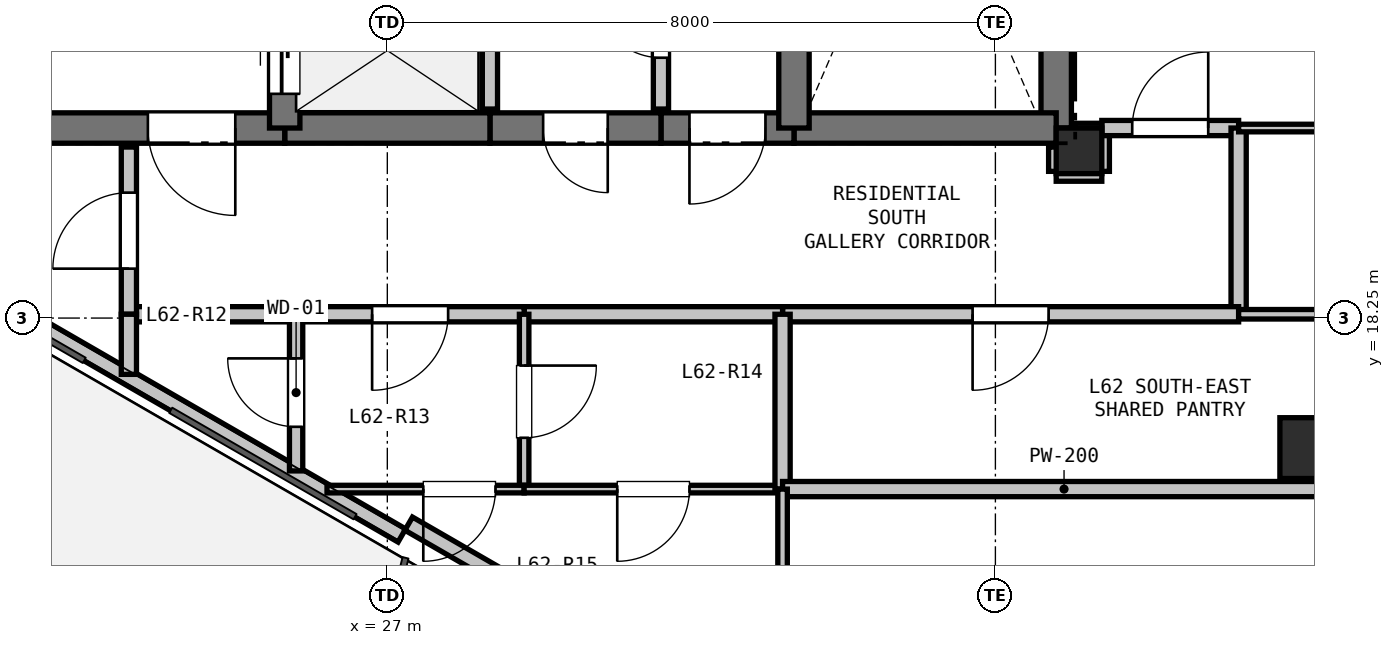
"""IFC4 building model, lengths in metres.
Left out: names, types, materials, properties, quantities, classifications, styles, units other than length and angle.
Written with IfcOpenShell. Run it as: python <this file> out.ifc"""

import sys

from ifc_helpers import new_model, si_unit, direction, frame, frame_2d, origin, origin_2d, place, context, subcontext, project, spatial, rectangle, hollow_rectangle, extrude, element, fill, save


model = new_model("IFC4")
c1 = context("Model", 3, precision=1e-05, world=origin(), true_north=direction((0.0, 1.0)))
c2 = subcontext(c1, "Body", "Model", "MODEL_VIEW")
j1 = project(units=[si_unit("LENGTHUNIT", "METRE"), si_unit("PLANEANGLEUNIT", "RADIAN")], contexts=[c1])
p1 = place(None, origin())
s1 = spatial("IfcSite", under=j1, at=p1, CompositionType="ELEMENT")
p2 = place(p1, origin())
s2 = spatial("IfcBuilding", under=s1, at=p2, CompositionType="ELEMENT")
p3 = place(p2, frame((0.0, 0.0, 223.2)))
s3 = spatial("IfcBuildingStorey", under=s2, at=p3, CompositionType="ELEMENT", Elevation=223.2)
p4 = place(p3, frame((36.1, 20.45, 0.0), z_axis=(0.0, 0.0, 1.0), x_axis=(1.0, 0.0, 0.0)))
e1 = element("IfcColumn", 1, at=p4, inside=s3, PredefinedType="COLUMN", context=c2, shape_type="SweptSolid", body=[
    extrude(rectangle(XDim=0.6, YDim=0.6, at=origin_2d()), origin(), (0.0, 0.0, 1.0), 3.3),
])
p5 = place(p3, frame((39.143, 16.539, -0.22), z_axis=(0.0, 0.0, 1.0), x_axis=(1.0, 0.0, 0.0)))
e2 = element("IfcColumn", 2, at=p5, inside=s3, PredefinedType="COLUMN", context=c2, shape_type="SweptSolid", body=[
    extrude(hollow_rectangle(XDim=0.8, YDim=0.8, WallThickness=0.025, at=origin_2d()), origin(), (0.0, 0.0, 1.0), 3.52),
])
p6 = place(p3, frame((27.191, 15.389, 0.0), z_axis=(0.0, 0.0, 1.0), x_axis=(-0.866019557082, 0.500010126649, 0.0)))
e3 = element("IfcWall", 3, at=p6, inside=s3, PredefinedType="PARAPET", context=c2, shape_type="SweptSolid", body=[
    extrude(rectangle(XDim=8.228, YDim=0.2, at=frame_2d((4.114, 0.0))), origin(), (0.0, 0.0, 1.0), 0.2),
])
p7 = place(p3, frame((28.754, 14.695, 0.0), z_axis=(0.0, 0.0, 1.0), x_axis=(-0.866025371046, 0.500000056704, 0.0)))
e4 = element("IfcWall", 4, at=p7, inside=s3, PredefinedType="PARAPET", context=c2, shape_type="SweptSolid", body=[
    extrude(rectangle(XDim=1.7, YDim=0.2, at=frame_2d((0.85, 0.0))), origin(), (0.0, 0.0, 1.0), 2.7),
])
p8 = place(p3, frame((35.8, 28.1, 0.0), z_axis=(0.0, 0.0, 1.0), x_axis=(0.0, -1.0, 0.0)))
e5 = element("IfcWall", 5, at=p8, inside=s3, PredefinedType="SHEAR", context=c2, shape_type="SweptSolid", body=[
    extrude(rectangle(XDim=7.35, YDim=0.4, at=frame_2d((3.675, 0.0))), origin(), (0.0, 0.0, 1.0), 3.08),
])
p9 = place(p3, frame((35.8, 20.75, 0.0), z_axis=(0.0, 0.0, 1.0), x_axis=(-1.0, 0.0, 0.0)))
e6 = element("IfcWall", 6, at=p9, inside=s3, PredefinedType="SHEAR", context=c2, shape_type="SweptSolid", body=[
    extrude(rectangle(XDim=3.45, YDim=0.4, at=frame_2d((1.725, 0.0))), origin(), (0.0, 0.0, 1.0), 3.08),
])
p10 = place(p3, frame((32.35, 20.75, 0.0), z_axis=(0.0, 0.0, 1.0), x_axis=(-1.0, 0.0, 0.0)))
e7 = element("IfcWall", 7, at=p10, inside=s3, PredefinedType="SHEAR", context=c2, shape_type="SweptSolid", body=[
    extrude(rectangle(XDim=1.75, YDim=0.4, at=frame_2d((0.875, 0.0))), origin(), (0.0, 0.0, 1.0), 3.08),
])
p11 = place(p10, frame((0.375, 0.0, 0.0)))
e8 = element("IfcOpeningElement", 8, at=p11, cuts=e7, PredefinedType="OPENING", context=c2, shape_type="SweptSolid", body=[
    extrude(rectangle(XDim=1.0, YDim=2.15, at=frame_2d((0.5, 1.075))), frame((0.0, 0.21, 0.0), z_axis=(0.0, -1.0, 0.0), x_axis=(1.0, 0.0, 0.0)), (0.0, 0.0, 1.0), 0.42),
])
p12 = place(p3, frame((30.6, 20.75, 0.0), z_axis=(0.0, 0.0, 1.0), x_axis=(-1.0, 0.0, 0.0)))
e9 = element("IfcWall", 9, at=p12, inside=s3, PredefinedType="SHEAR", context=c2, shape_type="SweptSolid", body=[
    extrude(rectangle(XDim=2.25, YDim=0.4, at=frame_2d((1.125, 0.0))), origin(), (0.0, 0.0, 1.0), 3.08),
])
p13 = place(p12, frame((0.7, 0.0, 0.0)))
e10 = element("IfcOpeningElement", 10, at=p13, cuts=e9, PredefinedType="OPENING", context=c2, shape_type="SweptSolid", body=[
    extrude(rectangle(XDim=0.85, YDim=2.1, at=frame_2d((0.425, 1.05))), frame((0.0, 0.21, 0.0), z_axis=(0.0, -1.0, 0.0), x_axis=(1.0, 0.0, 0.0)), (0.0, 0.0, 1.0), 0.42),
])
p14 = place(p3, frame((28.35, 20.75, 0.0), z_axis=(0.0, 0.0, 1.0), x_axis=(-1.0, 0.0, 0.0)))
e11 = element("IfcWall", 11, at=p14, inside=s3, PredefinedType="SHEAR", context=c2, shape_type="SweptSolid", body=[
    extrude(rectangle(XDim=2.7, YDim=0.4, at=frame_2d((1.35, 0.0))), origin(), (0.0, 0.0, 1.0), 3.08),
])
p15 = place(p3, frame((25.65, 20.75, 0.0), z_axis=(0.0, 0.0, 1.0), x_axis=(-1.0, 0.0, 0.0)))
e12 = element("IfcWall", 12, at=p15, inside=s3, PredefinedType="SHEAR", context=c2, shape_type="SweptSolid", body=[
    extrude(rectangle(XDim=3.45, YDim=0.4, at=frame_2d((1.725, 0.0))), origin(), (0.0, 0.0, 1.0), 3.08),
])
p16 = place(p15, frame((0.65, 0.0, 0.0)))
e13 = element("IfcOpeningElement", 13, at=p16, cuts=e12, PredefinedType="OPENING", context=c2, shape_type="SweptSolid", body=[
    extrude(rectangle(XDim=1.15, YDim=2.15, at=frame_2d((0.575, 1.075))), frame((0.0, 0.21, 0.0), z_axis=(0.0, -1.0, 0.0), x_axis=(1.0, 0.0, 0.0)), (0.0, 0.0, 1.0), 0.42),
])
p17 = place(p3, frame((25.65, 20.75, 0.0), z_axis=(0.0, 0.0, 1.0), x_axis=(0.0, 1.0, 0.0)))
e14 = element("IfcWall", 14, at=p17, inside=s3, PredefinedType="SHEAR", context=c2, shape_type="SweptSolid", body=[
    extrude(rectangle(XDim=2.0, YDim=0.4, at=frame_2d((1.0, 0.0))), origin(), (0.0, 0.0, 1.0), 3.08),
])
p18 = place(p17, frame((0.45, 0.0, 0.0)))
e15 = element("IfcOpeningElement", 15, at=p18, cuts=e14, PredefinedType="OPENING", context=c2, shape_type="SweptSolid", body=[
    extrude(rectangle(XDim=1.1, YDim=2.15, at=frame_2d((0.55, 1.075))), frame((0.0, 0.21, 0.0), z_axis=(0.0, -1.0, 0.0), x_axis=(1.0, 0.0, 0.0)), (0.0, 0.0, 1.0), 0.42),
])
p19 = place(p3, frame((32.35, 20.75, 0.0), z_axis=(0.0, 0.0, 1.0), x_axis=(0.0, 1.0, 0.0)))
e16 = element("IfcWall", 16, at=p19, inside=s3, PredefinedType="SHEAR", context=c2, shape_type="SweptSolid", body=[
    extrude(rectangle(XDim=4.8, YDim=0.4, at=frame_2d((2.4, 0.0))), origin(), (0.0, 0.0, 1.0), 3.08),
])
p20 = place(p3, frame((28.35, 23.2, 0.0), z_axis=(0.0, 0.0, 1.0), x_axis=(0.0, -1.0, 0.0)))
e17 = element("IfcWall", 17, at=p20, inside=s3, PredefinedType="PARTITIONING", context=c2, shape_type="SweptSolid", body=[
    extrude(rectangle(XDim=2.2, YDim=0.2, at=frame_2d((1.1, 0.0))), origin(), (0.0, 0.0, 1.0), 3.08),
])
p21 = place(p3, frame((30.6, 21.0, 0.0), z_axis=(0.0, 0.0, 1.0), x_axis=(0.0, 1.0, 0.0)))
e18 = element("IfcWall", 18, at=p21, inside=s3, PredefinedType="PARTITIONING", context=c2, shape_type="SweptSolid", body=[
    extrude(rectangle(XDim=2.2, YDim=0.2, at=frame_2d((1.1, 0.0))), origin(), (0.0, 0.0, 1.0), 3.08),
])
p22 = place(p21, frame((0.675, 0.0, 0.0)))
e19 = element("IfcOpeningElement", 19, at=p22, cuts=e18, PredefinedType="OPENING", context=c2, shape_type="SweptSolid", body=[
    extrude(rectangle(XDim=0.85, YDim=2.1, at=frame_2d((0.425, 1.05))), frame((0.0, 0.11, 0.0), z_axis=(0.0, -1.0, 0.0), x_axis=(1.0, 0.0, 0.0)), (0.0, 0.0, 1.0), 0.22),
])
p23 = place(p3, frame((35.8, 20.15, 0.0), z_axis=(0.0, 0.0, 1.0), x_axis=(1.0, 0.0, 0.0)))
e20 = element("IfcWall", 20, at=p23, inside=s3, PredefinedType="PARTITIONING", context=c2, shape_type="SweptSolid", body=[
    extrude(rectangle(XDim=0.6, YDim=0.2, at=frame_2d((0.3, 0.0))), origin(), (0.0, 0.0, 1.0), 2.528),
])
p24 = place(p3, frame((36.4, 20.18, 0.0), z_axis=(0.0, 0.0, 1.0), x_axis=(0.0, 1.0, 0.0)))
e21 = element("IfcWall", 21, at=p24, inside=s3, PredefinedType="PARTITIONING", context=c2, shape_type="SweptSolid", body=[
    extrude(rectangle(XDim=0.57, YDim=0.2, at=frame_2d((0.285, 0.0))), origin(), (0.0, 0.0, 1.0), 3.08),
])
p25 = place(p3, frame((36.4, 20.75, 0.0), z_axis=(0.0, 0.0, 1.0), x_axis=(1.0, 0.0, 0.0)))
e22 = element("IfcWall", 22, at=p25, inside=s3, PredefinedType="PARTITIONING", context=c2, shape_type="SweptSolid", body=[
    extrude(rectangle(XDim=1.8, YDim=0.2, at=frame_2d((0.9, 0.0))), origin(), (0.0, 0.0, 1.0), 3.08),
])
p26 = place(p25, frame((0.4, 0.0, 0.0)))
e23 = element("IfcOpeningElement", 23, at=p26, cuts=e22, PredefinedType="OPENING", context=c2, shape_type="SweptSolid", body=[
    extrude(rectangle(XDim=1.0, YDim=2.15, at=frame_2d((0.5, 1.075))), frame((0.0, 0.11, 0.0), z_axis=(0.0, -1.0, 0.0), x_axis=(1.0, 0.0, 0.0)), (0.0, 0.0, 1.0), 0.22),
])
p27 = place(p3, frame((38.2, 20.75, 0.0), z_axis=(0.0, 0.0, 1.0), x_axis=(0.0, -1.0, 0.0)))
e24 = element("IfcWall", 24, at=p27, inside=s3, PredefinedType="PARTITIONING", context=c2, shape_type="SweptSolid", body=[
    extrude(rectangle(XDim=2.45, YDim=0.2, at=frame_2d((1.225, 0.0))), origin(), (0.0, 0.0, 1.0), 3.08),
])
p28 = place(p3, frame((38.2, 18.3, 0.0), z_axis=(0.0, 0.0, 1.0), x_axis=(-1.0, 0.0, 0.0)))
e25 = element("IfcWall", 25, at=p28, inside=s3, PredefinedType="PARTITIONING", context=c2, shape_type="SweptSolid", body=[
    extrude(rectangle(XDim=6.0, YDim=0.2, at=frame_2d((3.0, 0.0))), origin(), (0.0, 0.0, 1.0), 2.528),
])
p29 = place(p28, frame((2.5, 0.0, 0.0)))
e26 = element("IfcOpeningElement", 26, at=p29, cuts=e25, PredefinedType="OPENING", context=c2, shape_type="SweptSolid", body=[
    extrude(rectangle(XDim=1.0, YDim=2.15, at=frame_2d((0.5, 1.075))), frame((0.0, 0.11, 0.0), z_axis=(0.0, -1.0, 0.0), x_axis=(1.0, 0.0, 0.0)), (0.0, 0.0, 1.0), 0.22),
])
p30 = place(p3, frame((32.2, 18.3, 0.0), z_axis=(0.0, 0.0, 1.0), x_axis=(-1.0, 0.0, 0.0)))
e27 = element("IfcWall", 27, at=p30, inside=s3, PredefinedType="PARTITIONING", context=c2, shape_type="SweptSolid", body=[
    extrude(rectangle(XDim=3.4, YDim=0.2, at=frame_2d((1.7, 0.0))), origin(), (0.0, 0.0, 1.0), 3.08),
])
p31 = place(p3, frame((28.8, 18.3, 0.0), z_axis=(0.0, 0.0, 1.0), x_axis=(-1.0, 0.0, 0.0)))
e28 = element("IfcWall", 28, at=p31, inside=s3, PredefinedType="PARTITIONING", context=c2, shape_type="SweptSolid", body=[
    extrude(rectangle(XDim=3.0, YDim=0.2, at=frame_2d((1.5, 0.0))), origin(), (0.0, 0.0, 1.0), 3.08),
])
p32 = place(p31, frame((1.0, 0.0, 0.0)))
e29 = element("IfcOpeningElement", 29, at=p32, cuts=e28, PredefinedType="OPENING", context=c2, shape_type="SweptSolid", body=[
    extrude(rectangle(XDim=1.0, YDim=2.15, at=frame_2d((0.5, 1.075))), frame((0.0, 0.11, 0.0), z_axis=(0.0, -1.0, 0.0), x_axis=(1.0, 0.0, 0.0)), (0.0, 0.0, 1.0), 0.22),
])
p33 = place(p3, frame((25.8, 18.3, 0.0), z_axis=(0.0, 0.0, 1.0), x_axis=(-1.0, 0.0, 0.0)))
e30 = element("IfcWall", 30, at=p33, inside=s3, PredefinedType="PARTITIONING", context=c2, shape_type="SweptSolid", body=[
    extrude(rectangle(XDim=2.2, YDim=0.2, at=frame_2d((1.1, 0.0))), origin(), (0.0, 0.0, 1.0), 2.365),
])
p34 = place(p3, frame((23.6, 18.3, 0.0), z_axis=(0.0, 0.0, 1.0), x_axis=(0.0, 1.0, 0.0)))
e31 = element("IfcWall", 31, at=p34, inside=s3, PredefinedType="PARTITIONING", context=c2, shape_type="SweptSolid", body=[
    extrude(rectangle(XDim=2.2, YDim=0.2, at=frame_2d((1.1, 0.0))), origin(), (0.0, 0.0, 1.0), 2.528),
])
p35 = place(p34, frame((0.6, 0.0, 0.0)))
e32 = element("IfcOpeningElement", 32, at=p35, cuts=e31, PredefinedType="OPENING", context=c2, shape_type="SweptSolid", body=[
    extrude(rectangle(XDim=1.0, YDim=2.15, at=frame_2d((0.5, 1.075))), frame((0.0, 0.11, 0.0), z_axis=(0.0, -1.0, 0.0), x_axis=(1.0, 0.0, 0.0)), (0.0, 0.0, 1.0), 0.22),
])
p36 = place(p3, frame((35.8, 20.5, 0.0), z_axis=(0.0, 0.0, 1.0), x_axis=(0.0, -1.0, 0.0)))
e33 = element("IfcWall", 33, at=p36, inside=s3, PredefinedType="PARTITIONING", context=c2, shape_type="SweptSolid", body=[
    extrude(rectangle(XDim=0.32, YDim=0.2, at=frame_2d((0.16, 0.0))), origin(), (0.0, 0.0, 1.0), 2.605),
])
p37 = place(p3, frame((28.8, 18.3, 0.0), z_axis=(0.0, 0.0, 1.0), x_axis=(0.0, -1.0, 0.0)))
e34 = element("IfcWall", 34, at=p37, inside=s3, PredefinedType="PARTITIONING", context=c2, shape_type="SweptSolid", body=[
    extrude(rectangle(XDim=2.3, YDim=0.125, at=frame_2d((1.15, 0.0))), origin(), (0.0, 0.0, 1.0), 3.08),
])
p38 = place(p37, frame((0.675, 0.0, 0.0)))
e35 = element("IfcOpeningElement", 35, at=p38, cuts=e34, PredefinedType="OPENING", context=c2, shape_type="SweptSolid", body=[
    extrude(rectangle(XDim=0.95, YDim=2.1, at=frame_2d((0.475, 1.05))), frame((0.0, 0.073, 0.0), z_axis=(0.0, -1.0, 0.0), x_axis=(1.0, 0.0, 0.0)), (0.0, 0.0, 1.0), 0.145),
])
p39 = place(p3, frame((28.8, 16.0, 0.0), z_axis=(0.0, 0.0, 1.0), x_axis=(-1.0, 0.0, 0.0)))
e36 = element("IfcWall", 36, at=p39, inside=s3, PredefinedType="PARTITIONING", context=c2, shape_type="SweptSolid", body=[
    extrude(rectangle(XDim=2.594, YDim=0.1, at=frame_2d((1.297, 0.0))), origin(), (0.0, 0.0, 1.0), 2.365),
])
p40 = place(p39, frame((0.377, 0.0, 0.0)))
e37 = element("IfcOpeningElement", 37, at=p40, cuts=e36, PredefinedType="OPENING", context=c2, shape_type="SweptSolid", body=[
    extrude(rectangle(XDim=0.95, YDim=2.1, at=frame_2d((0.475, 1.05))), frame((0.0, 0.06, 0.0), z_axis=(0.0, -1.0, 0.0), x_axis=(1.0, 0.0, 0.0)), (0.0, 0.0, 1.0), 0.12),
])
p41 = place(p3, frame((25.8, 16.239, 0.0), z_axis=(0.0, 0.0, 1.0), x_axis=(0.0, 1.0, 0.0)))
e38 = element("IfcWall", 38, at=p41, inside=s3, PredefinedType="PLUMBINGWALL", context=c2, shape_type="SweptSolid", body=[
    extrude(rectangle(XDim=2.061, YDim=0.175, at=frame_2d((1.031, 0.0))), origin(), (0.0, 0.0, 1.0), 2.365),
])
p42 = place(p41, frame((0.581, 0.0, 0.0)))
e39 = element("IfcOpeningElement", 39, at=p42, cuts=e38, PredefinedType="OPENING", context=c2, shape_type="SweptSolid", body=[
    extrude(rectangle(XDim=0.9, YDim=2.1, at=frame_2d((0.45, 1.05))), frame((0.0, 0.097, 0.0), z_axis=(0.0, -1.0, 0.0), x_axis=(1.0, 0.0, 0.0)), (0.0, 0.0, 1.0), 0.195),
])
p43 = place(p3, frame((23.6, 17.509, 0.0), z_axis=(0.0, 0.0, 1.0), x_axis=(0.0, 1.0, 0.0)))
e40 = element("IfcWall", 40, at=p43, inside=s3, PredefinedType="PARTITIONING", context=c2, shape_type="SweptSolid", body=[
    extrude(rectangle(XDim=0.791, YDim=0.2, at=frame_2d((0.396, 0.0))), origin(), (0.0, 0.0, 1.0), 2.365),
])
p44 = place(p3, frame((32.2, 16.0, 0.0), z_axis=(0.0, 0.0, 1.0), x_axis=(-1.0, 0.0, 0.0)))
e41 = element("IfcWall", 41, at=p44, inside=s3, PredefinedType="PARTITIONING", context=c2, shape_type="SweptSolid", body=[
    extrude(rectangle(XDim=3.4, YDim=0.1, at=frame_2d((1.7, 0.0))), origin(), (0.0, 0.0, 1.0), 3.08),
])
p45 = place(p44, frame((1.225, 0.0, 0.0)))
e42 = element("IfcOpeningElement", 42, at=p45, cuts=e41, PredefinedType="OPENING", context=c2, shape_type="SweptSolid", body=[
    extrude(rectangle(XDim=0.95, YDim=2.1, at=frame_2d((0.475, 1.05))), frame((0.0, 0.06, 0.0), z_axis=(0.0, -1.0, 0.0), x_axis=(1.0, 0.0, 0.0)), (0.0, 0.0, 1.0), 0.12),
])
p46 = place(p3, frame((32.2, 18.3, 0.0), z_axis=(0.0, 0.0, 1.0), x_axis=(0.0, -1.0, 0.0)))
e43 = element("IfcWall", 43, at=p46, inside=s3, PredefinedType="PARTITIONING", context=c2, shape_type="SweptSolid", body=[
    extrude(rectangle(XDim=2.3, YDim=0.2, at=frame_2d((1.15, 0.0))), origin(), (0.0, 0.0, 1.0), 3.08),
])
p47 = place(p3, frame((38.2, 18.3, 0.0), z_axis=(0.0, 0.0, 1.0), x_axis=(1.0, 0.0, 0.0)))
e44 = element("IfcWall", 44, at=p47, inside=s3, PredefinedType="PARTITIONING", context=c2, shape_type="SweptSolid", body=[
    extrude(rectangle(XDim=1.406, YDim=0.125, at=frame_2d((0.703, 0.0))), origin(), (0.0, 0.0, 1.0), 2.365),
])
p48 = place(p3, frame((39.606, 16.0, 0.0), z_axis=(0.0, 0.0, 1.0), x_axis=(-1.0, 0.0, 0.0)))
e45 = element("IfcWall", 45, at=p48, inside=s3, PredefinedType="PARTITIONING", context=c2, shape_type="SweptSolid", body=[
    extrude(rectangle(XDim=7.406, YDim=0.2, at=frame_2d((3.703, 0.0))), origin(), (0.0, 0.0, 1.0), 2.528),
])
p49 = place(p3, frame((39.606, 20.75, 0.0), z_axis=(0.0, 0.0, 1.0), x_axis=(-1.0, 0.0, 0.0)))
e46 = element("IfcWall", 46, at=p49, inside=s3, PredefinedType="PARTITIONING", context=c2, shape_type="SweptSolid", body=[
    extrude(rectangle(XDim=1.406, YDim=0.1, at=frame_2d((0.703, 0.0))), origin(), (0.0, 0.0, 1.0), 2.365),
])
p50 = place(p3, frame((36.4, 20.75, 0.0), z_axis=(0.0, 0.0, 1.0), x_axis=(-1.0, 0.0, 0.0)))
e47 = element("IfcWall", 47, at=p50, inside=s3, PredefinedType="PARTITIONING", context=c2, shape_type="SweptSolid", body=[
    extrude(rectangle(XDim=0.35, YDim=0.125, at=frame_2d((0.175, 0.0))), origin(), (0.0, 0.0, 1.0), 2.605),
])
p51 = place(p3, frame((32.2, 16.0, 0.0), z_axis=(0.0, 0.0, 1.0), x_axis=(0.0, -1.0, 0.0)))
e48 = element("IfcWall", 48, at=p51, inside=s3, PredefinedType="PARTITIONING", context=c2, shape_type="SweptSolid", body=[
    extrude(rectangle(XDim=3.344, YDim=0.125, at=frame_2d((1.672, 0.0))), origin(), (0.0, 0.0, 1.0), 2.365),
])
p52 = place(p51, frame((1.197, 0.0, 0.0)))
e49 = element("IfcOpeningElement", 49, at=p52, cuts=e48, PredefinedType="OPENING", context=c2, shape_type="SweptSolid", body=[
    extrude(rectangle(XDim=0.95, YDim=2.1, at=frame_2d((0.475, 1.05))), frame((0.0, 0.073, 0.0), z_axis=(0.0, -1.0, 0.0), x_axis=(1.0, 0.0, 0.0)), (0.0, 0.0, 1.0), 0.145),
])
p53 = place(p11, origin())
e50 = element("IfcDoor", 50, at=p53, inside=s3, OperationType="SINGLE_SWING_RIGHT", PredefinedType="DOOR", context=c2, shape_type="SweptSolid", body=[
    extrude(rectangle(XDim=1.0, YDim=2.15, at=frame_2d((0.5, 1.075))), frame((0.0, 0.025, 0.0), z_axis=(0.0, -1.0, 0.0), x_axis=(1.0, 0.0, 0.0)), (0.0, 0.0, 1.0), 0.05),
])
fill(e8, e50)
p54 = place(p18, origin())
e51 = element("IfcDoor", 51, at=p54, inside=s3, OperationType="SLIDING_TO_LEFT", PredefinedType="DOOR", context=c2, shape_type="SweptSolid", body=[
    extrude(rectangle(XDim=1.1, YDim=2.15, at=frame_2d((0.55, 1.075))), frame((0.0, 0.025, 0.0), z_axis=(0.0, -1.0, 0.0), x_axis=(1.0, 0.0, 0.0)), (0.0, 0.0, 1.0), 0.05),
])
fill(e15, e51)
p55 = place(p16, origin())
e52 = element("IfcDoor", 52, at=p55, inside=s3, OperationType="SINGLE_SWING_LEFT", PredefinedType="DOOR", context=c2, shape_type="SweptSolid", body=[
    extrude(rectangle(XDim=1.15, YDim=2.15, at=frame_2d((0.575, 1.075))), frame((0.0, 0.025, 0.0), z_axis=(0.0, -1.0, 0.0), x_axis=(1.0, 0.0, 0.0)), (0.0, 0.0, 1.0), 0.05),
])
fill(e13, e52)
p56 = place(p22, origin())
e53 = element("IfcDoor", 53, at=p56, inside=s3, OperationType="SINGLE_SWING_RIGHT", PredefinedType="DOOR", context=c2, shape_type="SweptSolid", body=[
    extrude(rectangle(XDim=0.85, YDim=2.1, at=frame_2d((0.425, 1.05))), frame((0.0, 0.025, 0.0), z_axis=(0.0, -1.0, 0.0), x_axis=(1.0, 0.0, 0.0)), (0.0, 0.0, 1.0), 0.05),
])
fill(e19, e53)
p57 = place(p32, origin())
e54 = element("IfcDoor", 54, at=p57, inside=s3, OperationType="SINGLE_SWING_RIGHT", PredefinedType="DOOR", context=c2, shape_type="SweptSolid", body=[
    extrude(rectangle(XDim=1.0, YDim=2.15, at=frame_2d((0.5, 1.075))), frame((0.0, 0.025, 0.0), z_axis=(0.0, -1.0, 0.0), x_axis=(1.0, 0.0, 0.0)), (0.0, 0.0, 1.0), 0.05),
])
fill(e29, e54)
p58 = place(p13, origin())
e55 = element("IfcDoor", 55, at=p58, inside=s3, OperationType="SINGLE_SWING_LEFT", PredefinedType="DOOR", context=c2, shape_type="SweptSolid", body=[
    extrude(rectangle(XDim=0.85, YDim=2.1, at=frame_2d((0.425, 1.05))), frame((0.0, 0.025, 0.0), z_axis=(0.0, -1.0, 0.0), x_axis=(1.0, 0.0, 0.0)), (0.0, 0.0, 1.0), 0.05),
])
fill(e10, e55)
p59 = place(p29, origin())
e56 = element("IfcDoor", 56, at=p59, inside=s3, OperationType="SINGLE_SWING_RIGHT", PredefinedType="DOOR", context=c2, shape_type="SweptSolid", body=[
    extrude(rectangle(XDim=1.0, YDim=2.15, at=frame_2d((0.5, 1.075))), frame((0.0, 0.025, 0.0), z_axis=(0.0, -1.0, 0.0), x_axis=(1.0, 0.0, 0.0)), (0.0, 0.0, 1.0), 0.05),
])
fill(e26, e56)
p60 = place(p35, origin())
e57 = element("IfcDoor", 57, at=p60, inside=s3, OperationType="SINGLE_SWING_LEFT", PredefinedType="DOOR", context=c2, shape_type="SweptSolid", body=[
    extrude(rectangle(XDim=1.0, YDim=2.15, at=frame_2d((0.5, 1.075))), frame((0.0, 0.025, 0.0), z_axis=(0.0, -1.0, 0.0), x_axis=(1.0, 0.0, 0.0)), (0.0, 0.0, 1.0), 0.05),
])
fill(e32, e57)
p61 = place(p26, origin())
e58 = element("IfcDoor", 58, at=p61, inside=s3, OperationType="SINGLE_SWING_RIGHT", PredefinedType="DOOR", context=c2, shape_type="SweptSolid", body=[
    extrude(rectangle(XDim=1.0, YDim=2.15, at=frame_2d((0.5, 1.075))), frame((0.0, 0.025, 0.0), z_axis=(0.0, -1.0, 0.0), x_axis=(1.0, 0.0, 0.0)), (0.0, 0.0, 1.0), 0.05),
])
fill(e23, e58)
p62 = place(p42, origin())
e59 = element("IfcDoor", 59, at=p62, inside=s3, OperationType="SINGLE_SWING_RIGHT", PredefinedType="DOOR", context=c2, shape_type="SweptSolid", body=[
    extrude(rectangle(XDim=0.9, YDim=2.1, at=frame_2d((0.45, 1.05))), frame((0.0, 0.025, 0.0), z_axis=(0.0, -1.0, 0.0), x_axis=(1.0, 0.0, 0.0)), (0.0, 0.0, 1.0), 0.05),
])
fill(e39, e59)
p63 = place(p38, origin())
e60 = element("IfcDoor", 60, at=p63, inside=s3, OperationType="SINGLE_SWING_LEFT", PredefinedType="DOOR", context=c2, shape_type="SweptSolid", body=[
    extrude(rectangle(XDim=0.95, YDim=2.1, at=frame_2d((0.475, 1.05))), frame((0.0, 0.025, 0.0), z_axis=(0.0, -1.0, 0.0), x_axis=(1.0, 0.0, 0.0)), (0.0, 0.0, 1.0), 0.05),
])
fill(e35, e60)
p64 = place(p40, origin())
e61 = element("IfcDoor", 61, at=p64, inside=s3, OperationType="SINGLE_SWING_RIGHT", PredefinedType="DOOR", context=c2, shape_type="SweptSolid", body=[
    extrude(rectangle(XDim=0.95, YDim=2.1, at=frame_2d((0.475, 1.05))), frame((0.0, 0.025, 0.0), z_axis=(0.0, -1.0, 0.0), x_axis=(1.0, 0.0, 0.0)), (0.0, 0.0, 1.0), 0.05),
])
fill(e37, e61)
p65 = place(p45, origin())
e62 = element("IfcDoor", 62, at=p65, inside=s3, OperationType="SINGLE_SWING_RIGHT", PredefinedType="DOOR", context=c2, shape_type="SweptSolid", body=[
    extrude(rectangle(XDim=0.95, YDim=2.1, at=frame_2d((0.475, 1.05))), frame((0.0, 0.025, 0.0), z_axis=(0.0, -1.0, 0.0), x_axis=(1.0, 0.0, 0.0)), (0.0, 0.0, 1.0), 0.05),
])
fill(e42, e62)
save(model, sys.argv[1])
